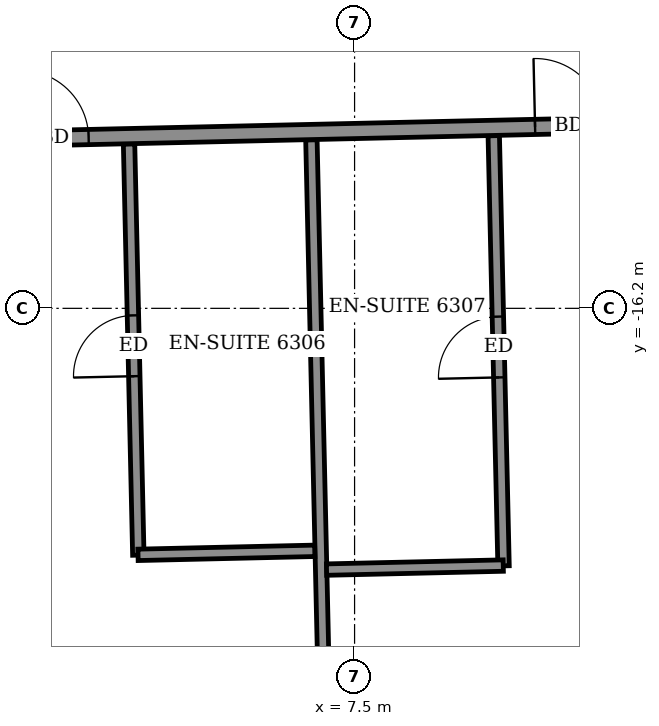
"""IFC4 building model, lengths in metres.
Left out: names, types, materials, properties, quantities, classifications, styles, units other than length and angle.
Written with IfcOpenShell. Run it as: python <this file> out.ifc"""

import sys

from ifc_helpers import new_model, si_unit, direction, frame, frame_2d, origin, place, context, subcontext, project, spatial, rectangle, extrude, element, fill, save


model = new_model("IFC4")
c1 = context("Model", 3, precision=1e-05, world=origin(), true_north=direction((0.0, 1.0)))
c2 = subcontext(c1, "Body", "Model", "MODEL_VIEW")
j1 = project(units=[si_unit("LENGTHUNIT", "METRE"), si_unit("PLANEANGLEUNIT", "RADIAN")], contexts=[c1])
p1 = place(None, origin())
s1 = spatial("IfcSite", under=j1, at=p1, CompositionType="ELEMENT")
p2 = place(p1, origin())
s2 = spatial("IfcBuilding", under=s1, at=p2, CompositionType="ELEMENT")
p3 = place(p2, frame((0.0, 0.0, 249.1)))
s3 = spatial("IfcBuildingStorey", under=s2, at=p3, CompositionType="ELEMENT", Elevation=249.1)
p4 = place(p3, frame((7.19, -25.357, 0.0), z_axis=(0.0, 0.0, 1.0), x_axis=(-0.022684355347, 0.999742676904, 0.0)))
e1 = element("IfcWall", 1, at=p4, inside=s3, PredefinedType="PARTITIONING", context=c2, shape_type="SweptSolid", body=[
    extrude(rectangle(XDim=11.376, YDim=0.15, at=frame_2d((5.688, 0.0))), origin(), (0.0, 0.0, 1.0), 2.5),
])
p5 = place(p3, frame((9.46, -19.588, 0.0), z_axis=(0.0, 0.0, 1.0), x_axis=(-0.022773332125, 0.999740654042, 0.0)))
e2 = element("IfcWall", 2, at=p5, inside=s3, PredefinedType="PARTITIONING", context=c2, shape_type="SweptSolid", body=[
    extrude(rectangle(XDim=5.66, YDim=0.15, at=frame_2d((2.83, 0.0))), origin(), (0.0, 0.0, 1.0), 3.05),
])
p6 = place(p5, frame((2.48, 0.0, 0.0)))
e3 = element("IfcOpeningElement", 3, at=p6, cuts=e2, PredefinedType="OPENING", context=c2, shape_type="SweptSolid", body=[
    extrude(rectangle(XDim=0.8, YDim=2.1, at=frame_2d((0.4, 1.05))), frame((0.0, 0.085, 0.0), z_axis=(0.0, -1.0, 0.0), x_axis=(1.0, 0.0, 0.0)), (0.0, 0.0, 1.0), 0.17),
])
p7 = place(p3, frame((7.131, -19.637, 0.0), z_axis=(0.0, 0.0, 1.0), x_axis=(0.999740478815, 0.022781023197, 0.0)))
e4 = element("IfcWall", 4, at=p7, inside=s3, PredefinedType="PARTITIONING", context=c2, shape_type="SweptSolid", body=[
    extrude(rectangle(XDim=2.325, YDim=0.15, at=frame_2d((1.163, 0.0))), origin(), (0.0, 0.0, 1.0), 3.05),
])
p8 = place(p3, frame((4.655, -19.447, 0.0), z_axis=(0.0, 0.0, 1.0), x_axis=(-0.022562523897, 0.999745433856, 0.0)))
e5 = element("IfcWall", 5, at=p8, inside=s3, PredefinedType="PARTITIONING", context=c2, shape_type="SweptSolid", body=[
    extrude(rectangle(XDim=5.41, YDim=0.15, at=frame_2d((2.705, 0.0))), origin(), (0.0, 0.0, 1.0), 3.05),
])
p9 = place(p8, frame((2.355, 0.0, 0.0)))
e6 = element("IfcOpeningElement", 6, at=p9, cuts=e5, PredefinedType="OPENING", context=c2, shape_type="SweptSolid", body=[
    extrude(rectangle(XDim=0.8, YDim=2.1, at=frame_2d((0.4, 1.05))), frame((0.0, 0.085, 0.0), z_axis=(0.0, -1.0, 0.0), x_axis=(1.0, 0.0, 0.0)), (0.0, 0.0, 1.0), 0.17),
])
p10 = place(p3, frame((4.651, -19.443, 0.0), z_axis=(0.0, 0.0, 1.0), x_axis=(0.999738137323, 0.022883548292, 0.0)))
e7 = element("IfcWall", 7, at=p10, inside=s3, PredefinedType="PARTITIONING", context=c2, shape_type="SweptSolid", body=[
    extrude(rectangle(XDim=2.326, YDim=0.15, at=frame_2d((1.163, 0.0))), origin(), (0.0, 0.0, 1.0), 3.05),
])
p11 = place(p3, frame((-27.016, -14.65, 0.0), z_axis=(0.0, 0.0, 1.0), x_axis=(0.999742874861, 0.022675629315, 0.0)))
e8 = element("IfcWall", 8, at=p11, inside=s3, PredefinedType="PARTITIONING", context=c2, shape_type="SweptSolid", body=[
    extrude(rectangle(XDim=50.883, YDim=0.2, at=frame_2d((25.442, 0.0))), origin(), (0.0, 0.0, 1.0), 3.05),
])
p12 = place(p11, frame((1.575, 0.0, 0.0)))
e9 = element("IfcOpeningElement", 9, at=p12, cuts=e8, PredefinedType="OPENING", context=c2, shape_type="SweptSolid", body=[
    extrude(rectangle(XDim=1.0, YDim=2.1, at=frame_2d((0.5, 1.05))), frame((0.0, 0.11, 0.0), z_axis=(0.0, -1.0, 0.0), x_axis=(1.0, 0.0, 0.0)), (0.0, 0.0, 1.0), 0.22),
])
p13 = place(p11, frame((6.4, 0.0, 0.0)))
e10 = element("IfcOpeningElement", 10, at=p13, cuts=e8, PredefinedType="OPENING", context=c2, shape_type="SweptSolid", body=[
    extrude(rectangle(XDim=0.9, YDim=2.1, at=frame_2d((0.45, 1.05))), frame((0.0, 0.11, 0.0), z_axis=(0.0, -1.0, 0.0), x_axis=(1.0, 0.0, 0.0)), (0.0, 0.0, 1.0), 0.22),
])
p14 = place(p11, frame((11.025, 0.0, 0.0)))
e11 = element("IfcOpeningElement", 11, at=p14, cuts=e8, PredefinedType="OPENING", context=c2, shape_type="SweptSolid", body=[
    extrude(rectangle(XDim=0.9, YDim=2.1, at=frame_2d((0.45, 1.05))), frame((0.0, 0.11, 0.0), z_axis=(0.0, -1.0, 0.0), x_axis=(1.0, 0.0, 0.0)), (0.0, 0.0, 1.0), 0.22),
])
p15 = place(p11, frame((12.925, 0.0, 0.0)))
e12 = element("IfcOpeningElement", 12, at=p15, cuts=e8, PredefinedType="OPENING", context=c2, shape_type="SweptSolid", body=[
    extrude(rectangle(XDim=0.9, YDim=2.1, at=frame_2d((0.45, 1.05))), frame((0.0, 0.11, 0.0), z_axis=(0.0, -1.0, 0.0), x_axis=(1.0, 0.0, 0.0)), (0.0, 0.0, 1.0), 0.22),
])
p16 = place(p11, frame((19.65, 0.0, 0.0)))
e13 = element("IfcOpeningElement", 13, at=p16, cuts=e8, PredefinedType="OPENING", context=c2, shape_type="SweptSolid", body=[
    extrude(rectangle(XDim=0.9, YDim=2.1, at=frame_2d((0.45, 1.05))), frame((0.0, 0.11, 0.0), z_axis=(0.0, -1.0, 0.0), x_axis=(1.0, 0.0, 0.0)), (0.0, 0.0, 1.0), 0.22),
])
p17 = place(p11, frame((21.575, 0.0, 0.0)))
e14 = element("IfcOpeningElement", 14, at=p17, cuts=e8, PredefinedType="OPENING", context=c2, shape_type="SweptSolid", body=[
    extrude(rectangle(XDim=0.9, YDim=2.1, at=frame_2d((0.45, 1.05))), frame((0.0, 0.11, 0.0), z_axis=(0.0, -1.0, 0.0), x_axis=(1.0, 0.0, 0.0)), (0.0, 0.0, 1.0), 0.22),
])
p18 = place(p11, frame((28.25, 0.0, 0.0)))
e15 = element("IfcOpeningElement", 15, at=p18, cuts=e8, PredefinedType="OPENING", context=c2, shape_type="SweptSolid", body=[
    extrude(rectangle(XDim=0.9, YDim=2.1, at=frame_2d((0.45, 1.05))), frame((0.0, 0.11, 0.0), z_axis=(0.0, -1.0, 0.0), x_axis=(1.0, 0.0, 0.0)), (0.0, 0.0, 1.0), 0.22),
])
p19 = place(p11, frame((30.125, 0.0, 0.0)))
e16 = element("IfcOpeningElement", 16, at=p19, cuts=e8, PredefinedType="OPENING", context=c2, shape_type="SweptSolid", body=[
    extrude(rectangle(XDim=0.9, YDim=2.1, at=frame_2d((0.45, 1.05))), frame((0.0, 0.11, 0.0), z_axis=(0.0, -1.0, 0.0), x_axis=(1.0, 0.0, 0.0)), (0.0, 0.0, 1.0), 0.22),
])
p20 = place(p11, frame((36.9, 0.0, 0.0)))
e17 = element("IfcOpeningElement", 17, at=p20, cuts=e8, PredefinedType="OPENING", context=c2, shape_type="SweptSolid", body=[
    extrude(rectangle(XDim=0.9, YDim=2.1, at=frame_2d((0.45, 1.05))), frame((0.0, 0.11, 0.0), z_axis=(0.0, -1.0, 0.0), x_axis=(1.0, 0.0, 0.0)), (0.0, 0.0, 1.0), 0.22),
])
p21 = place(p11, frame((38.85, 0.0, 0.0)))
e18 = element("IfcOpeningElement", 18, at=p21, cuts=e8, PredefinedType="OPENING", context=c2, shape_type="SweptSolid", body=[
    extrude(rectangle(XDim=0.9, YDim=2.1, at=frame_2d((0.45, 1.05))), frame((0.0, 0.11, 0.0), z_axis=(0.0, -1.0, 0.0), x_axis=(1.0, 0.0, 0.0)), (0.0, 0.0, 1.0), 0.22),
])
p22 = place(p11, frame((48.629, 0.0, 0.0)))
e19 = element("IfcOpeningElement", 19, at=p22, cuts=e8, PredefinedType="OPENING", context=c2, shape_type="SweptSolid", body=[
    extrude(rectangle(XDim=1.0, YDim=2.1, at=frame_2d((0.5, 1.05))), frame((0.0, 0.11, 0.0), z_axis=(0.0, -1.0, 0.0), x_axis=(1.0, 0.0, 0.0)), (0.0, 0.0, 1.0), 0.22),
])
p23 = place(p11, frame((43.6, 0.0, 0.0)))
e20 = element("IfcOpeningElement", 20, at=p23, cuts=e8, PredefinedType="OPENING", context=c2, shape_type="SweptSolid", body=[
    extrude(rectangle(XDim=0.9, YDim=2.1, at=frame_2d((0.45, 1.05))), frame((0.0, 0.11, 0.0), z_axis=(0.0, -1.0, 0.0), x_axis=(1.0, 0.0, 0.0)), (0.0, 0.0, 1.0), 0.22),
])
p24 = place(p19, origin())
e21 = element("IfcDoor", 21, at=p24, inside=s3, OperationType="SINGLE_SWING_RIGHT", PredefinedType="DOOR", context=c2, shape_type="SweptSolid", body=[
    extrude(rectangle(XDim=0.9, YDim=2.1, at=frame_2d((0.45, 1.05))), frame((0.0, 0.025, 0.0), z_axis=(0.0, -1.0, 0.0), x_axis=(1.0, 0.0, 0.0)), (0.0, 0.0, 1.0), 0.05),
])
fill(e16, e21)
p25 = place(p9, origin())
e22 = element("IfcDoor", 22, at=p25, inside=s3, OperationType="SINGLE_SWING_RIGHT", PredefinedType="DOOR", context=c2, shape_type="SweptSolid", body=[
    extrude(rectangle(XDim=0.8, YDim=2.1, at=frame_2d((0.4, 1.05))), frame((0.0, 0.025, 0.0), z_axis=(0.0, -1.0, 0.0), x_axis=(1.0, 0.0, 0.0)), (0.0, 0.0, 1.0), 0.05),
])
fill(e6, e22)
p26 = place(p20, origin())
e23 = element("IfcDoor", 23, at=p26, inside=s3, OperationType="SINGLE_SWING_LEFT", PredefinedType="DOOR", context=c2, shape_type="SweptSolid", body=[
    extrude(rectangle(XDim=0.9, YDim=2.1, at=frame_2d((0.45, 1.05))), frame((0.0, 0.025, 0.0), z_axis=(0.0, -1.0, 0.0), x_axis=(1.0, 0.0, 0.0)), (0.0, 0.0, 1.0), 0.05),
])
fill(e17, e23)
p27 = place(p6, origin())
e24 = element("IfcDoor", 24, at=p27, inside=s3, OperationType="SINGLE_SWING_LEFT", PredefinedType="DOOR", context=c2, shape_type="SweptSolid", body=[
    extrude(rectangle(XDim=0.8, YDim=2.1, at=frame_2d((0.4, 1.05))), frame((0.0, 0.025, 0.0), z_axis=(0.0, -1.0, 0.0), x_axis=(1.0, 0.0, 0.0)), (0.0, 0.0, 1.0), 0.05),
])
fill(e3, e24)
save(model, sys.argv[1])
